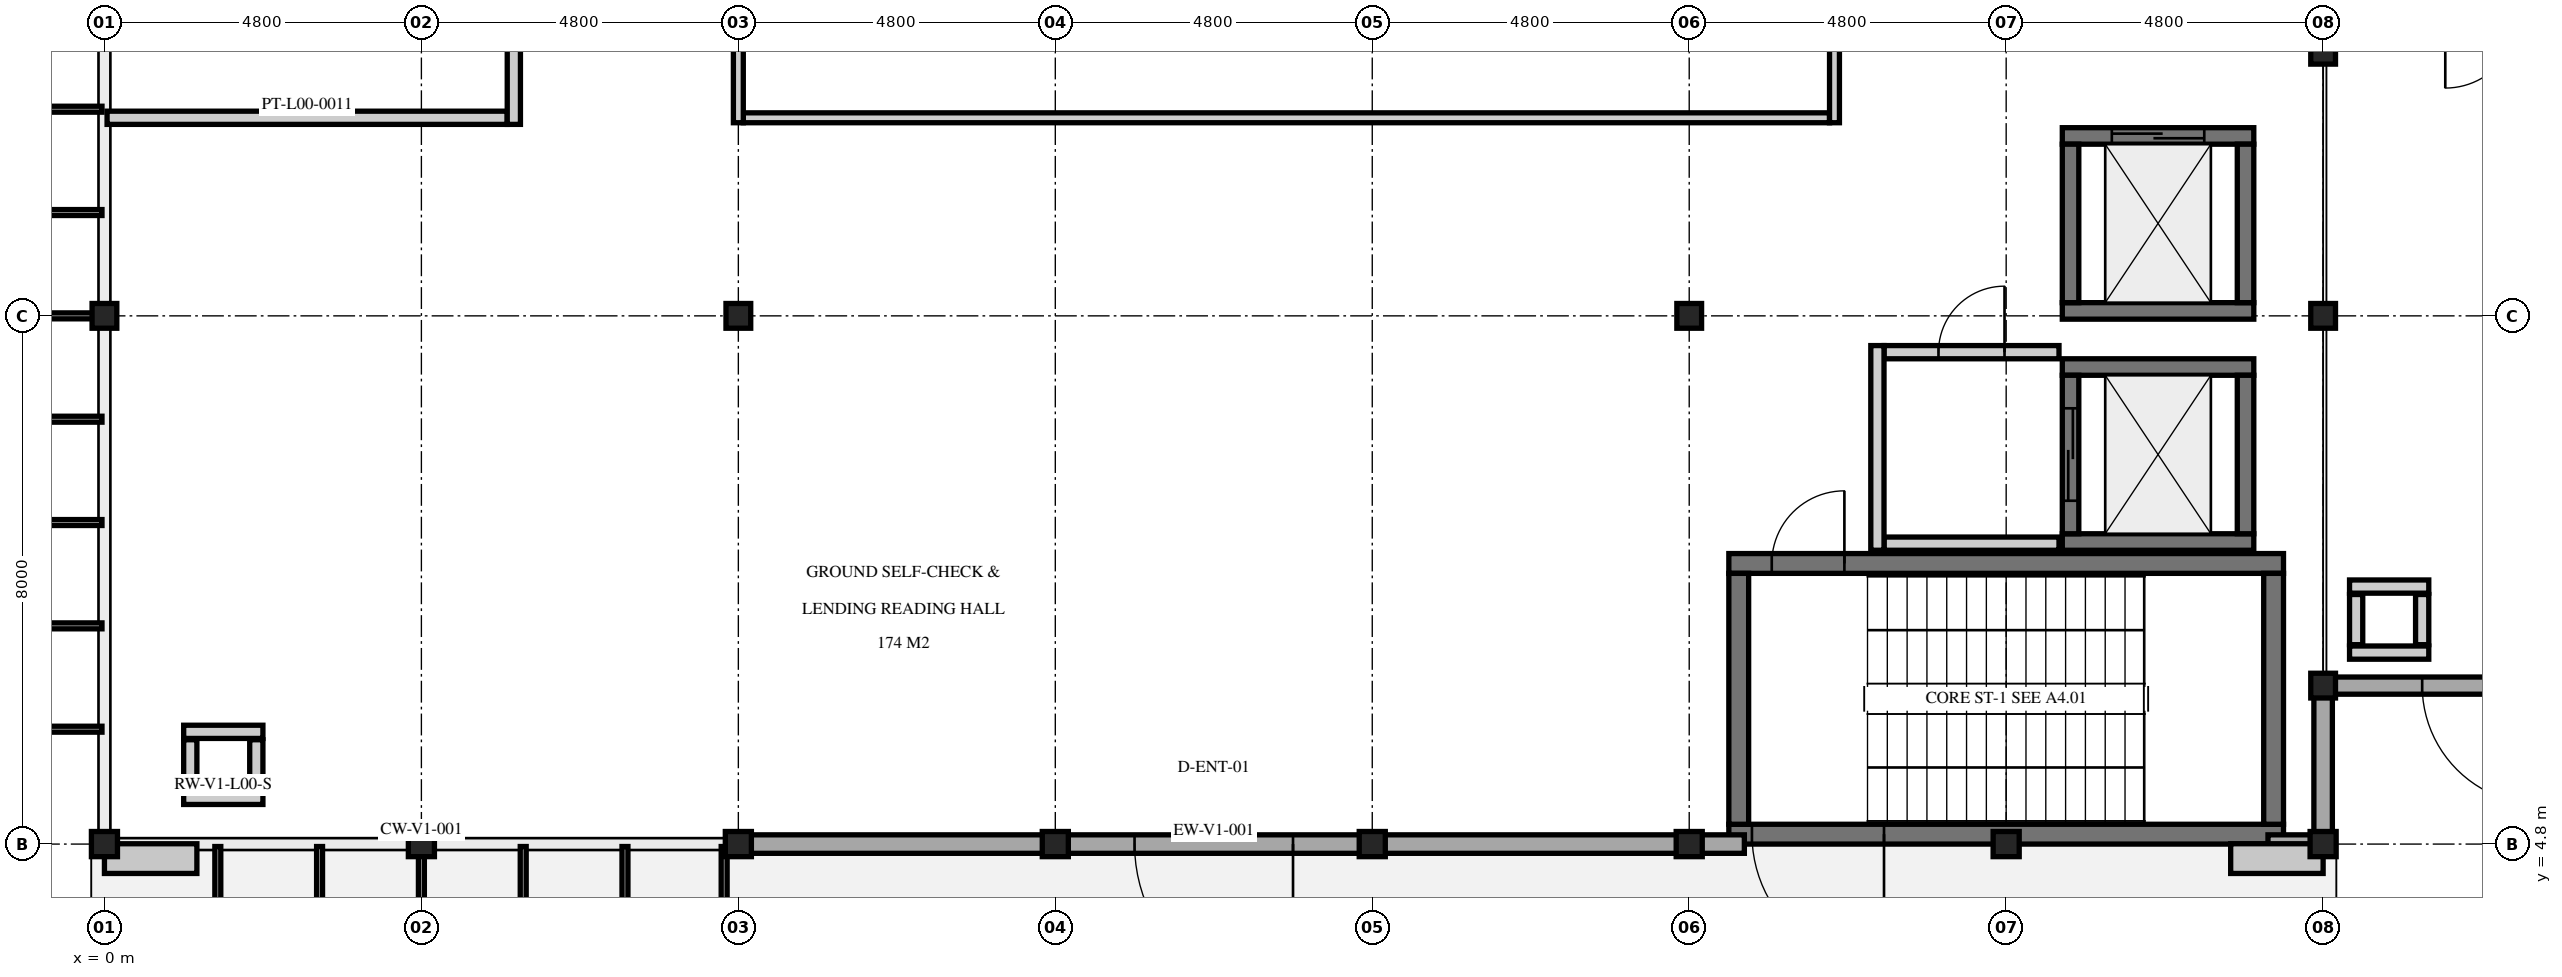
"""IFC4 building model, lengths in metres.
Left out: names, types, materials, properties, quantities, classifications, styles, units other than length and angle.
Written with IfcOpenShell. Run it as: python <this file> out.ifc"""

import sys

from ifc_helpers import new_model, si_unit, direction, frame, frame_2d, origin, origin_2d, place, context, subcontext, project, spatial, rectangle, i_section, extrude, element, fill, save


model = new_model("IFC4")
c1 = context("Model", 3, precision=1e-05, world=origin(), true_north=direction((0.0, 1.0)))
c2 = subcontext(c1, "Body", "Model", "MODEL_VIEW")
j1 = project(units=[si_unit("LENGTHUNIT", "METRE"), si_unit("PLANEANGLEUNIT", "RADIAN")], contexts=[c1])
p1 = place(None, origin())
s1 = spatial("IfcSite", under=j1, at=p1, CompositionType="ELEMENT")
p2 = place(p1, origin())
s2 = spatial("IfcBuilding", under=s1, at=p2, CompositionType="ELEMENT")
p3 = place(p2, origin())
s3 = spatial("IfcBuildingStorey", under=s2, at=p3, CompositionType="ELEMENT", Elevation=0.0)
for number, where, z_axis, x_axis in (
    (1, (0.0, 4.8, 0.0), (0.0, 0.0, 1.0), (1.0, 0.0, 0.0)),
    (2, (4.8, 4.8, 0.0), (0.0, 0.0, 1.0), (1.0, 0.0, 0.0)),
    (3, (9.6, 4.8, 0.0), (0.0, 0.0, 1.0), (1.0, 0.0, 0.0)),
    (4, (14.4, 4.8, 0.0), (0.0, 0.0, 1.0), (1.0, 0.0, 0.0)),
    (5, (19.2, 4.8, 0.0), (0.0, 0.0, 1.0), (1.0, 0.0, 0.0)),
    (6, (24.0, 4.8, 0.0), (0.0, 0.0, 1.0), (1.0, 0.0, 0.0)),
    (7, (28.8, 4.8, 0.0), (0.0, 0.0, 1.0), (1.0, 0.0, 0.0)),
    (8, (33.6, 4.8, 0.0), (0.0, 0.0, 1.0), (1.0, 0.0, 0.0)),
):
    element("IfcColumn", number, at=place(p3, frame(where, z_axis=z_axis, x_axis=x_axis)), inside=s3, PredefinedType="COLUMN", context=c2, shape_type="SweptSolid", body=[
        extrude(i_section(OverallWidth=0.395, OverallDepth=0.381, WebThickness=0.018, FlangeThickness=0.03, at=origin_2d()), origin(), (0.0, 0.0, 1.0), 5.1),
    ])
for number, where, z_axis, x_axis in (
    (9, (0.0, 12.8, 0.0), (0.0, 0.0, 1.0), (1.0, 0.0, 0.0)),
    (10, (33.6, 7.2, 0.0), (0.0, 0.0, 1.0), (1.0, 0.0, 0.0)),
    (11, (33.6, 12.8, 0.0), (0.0, 0.0, 1.0), (1.0, 0.0, 0.0)),
    (12, (33.6, 16.8, 0.0), (0.0, 0.0, 1.0), (1.0, 0.0, 0.0)),
    (13, (9.6, 12.8, 0.0), (0.0, 0.0, 1.0), (1.0, 0.0, 0.0)),
    (14, (24.0, 12.8, 0.0), (0.0, 0.0, 1.0), (1.0, 0.0, 0.0)),
):
    element("IfcColumn", number, at=place(p3, frame(where, z_axis=z_axis, x_axis=x_axis)), inside=s3, PredefinedType="COLUMN", context=c2, shape_type="SweptSolid", body=[
        extrude(i_section(OverallWidth=0.375, OverallDepth=0.375, WebThickness=0.017, FlangeThickness=0.027, at=origin_2d()), origin(), (0.0, 0.0, 1.0), 5.1),
    ])
p4 = place(p3, frame((33.0, 4.95, 0.0), z_axis=(0.0, 0.0, 1.0), x_axis=(-1.0, 0.0, 0.0)))
e15 = element("IfcWall", 15, at=p4, inside=s3, PredefinedType="SHEAR", context=c2, shape_type="SweptSolid", body=[
    extrude(rectangle(XDim=8.4, YDim=0.3, at=frame_2d((4.2, 0.0))), origin(), (0.0, 0.0, 1.0), 4.88),
])
p5 = place(p4, frame((6.05, 0.0, 0.0)))
e16 = element("IfcOpeningElement", 16, at=p5, cuts=e15, PredefinedType="OPENING", context=c2, shape_type="SweptSolid", body=[
    extrude(rectangle(XDim=2.0, YDim=2.4, at=frame_2d((1.0, 1.2))), frame((0.0, 0.16, 0.0), z_axis=(0.0, -1.0, 0.0), x_axis=(1.0, 0.0, 0.0)), (0.0, 0.0, 1.0), 0.32),
])
p6 = place(p3, frame((24.6, 9.05, 0.0), z_axis=(0.0, 0.0, 1.0), x_axis=(1.0, 0.0, 0.0)))
e17 = element("IfcWall", 17, at=p6, inside=s3, PredefinedType="SHEAR", context=c2, shape_type="SweptSolid", body=[
    extrude(rectangle(XDim=8.4, YDim=0.3, at=frame_2d((4.2, 0.0))), origin(), (0.0, 0.0, 1.0), 4.88),
])
p7 = place(p6, frame((0.65, 0.0, 0.0)))
e18 = element("IfcOpeningElement", 18, at=p7, cuts=e17, PredefinedType="OPENING", context=c2, shape_type="SweptSolid", body=[
    extrude(rectangle(XDim=1.1, YDim=2.2, at=frame_2d((0.55, 1.1))), frame((0.0, 0.16, 0.0), z_axis=(0.0, -1.0, 0.0), x_axis=(1.0, 0.0, 0.0)), (0.0, 0.0, 1.0), 0.32),
])
for number, where, z_axis, x_axis in (
    (19, (24.75, 5.1, 0.0), (0.0, 0.0, 1.0), (0.0, 1.0, 0.0)),
    (20, (32.85, 8.9, 0.0), (0.0, 0.0, 1.0), (0.0, -1.0, 0.0)),
):
    element("IfcWall", number, at=place(p3, frame(where, z_axis=z_axis, x_axis=x_axis)), inside=s3, PredefinedType="SHEAR", context=c2, shape_type="SweptSolid", body=[
        extrude(rectangle(XDim=3.8, YDim=0.3, at=frame_2d((1.9, 0.0))), origin(), (0.0, 0.0, 1.0), 4.88),
    ])
for number, where, z_axis, x_axis in (
    (21, (32.55, 9.375, 0.0), (0.0, 0.0, 1.0), (-1.0, 0.0, 0.0)),
    (22, (29.65, 12.025, 0.0), (0.0, 0.0, 1.0), (1.0, 0.0, 0.0)),
):
    element("IfcWall", number, at=place(p3, frame(where, z_axis=z_axis, x_axis=x_axis)), inside=s3, PredefinedType="SHEAR", context=c2, shape_type="SweptSolid", body=[
        extrude(rectangle(XDim=2.9, YDim=0.25, at=frame_2d((1.45, 0.0))), origin(), (0.0, 0.0, 1.0), 4.88),
    ])
p8 = place(p3, frame((29.775, 9.5, 0.0), z_axis=(0.0, 0.0, 1.0), x_axis=(0.0, 1.0, 0.0)))
e23 = element("IfcWall", 23, at=p8, inside=s3, PredefinedType="SHEAR", context=c2, shape_type="SweptSolid", body=[
    extrude(rectangle(XDim=2.4, YDim=0.25, at=frame_2d((1.2, 0.0))), origin(), (0.0, 0.0, 1.0), 4.88),
])
p9 = place(p8, frame((0.5, 0.0, 0.0)))
e24 = element("IfcOpeningElement", 24, at=p9, cuts=e23, PredefinedType="OPENING", context=c2, shape_type="SweptSolid", body=[
    extrude(rectangle(XDim=1.4, YDim=2.2, at=frame_2d((0.7, 1.1))), frame((0.0, 0.135, 0.0), z_axis=(0.0, -1.0, 0.0), x_axis=(1.0, 0.0, 0.0)), (0.0, 0.0, 1.0), 0.27),
])
p10 = place(p3, frame((32.425, 11.9, 0.0), z_axis=(0.0, 0.0, 1.0), x_axis=(0.0, -1.0, 0.0)))
e25 = element("IfcWall", 25, at=p10, inside=s3, PredefinedType="SHEAR", context=c2, shape_type="SweptSolid", body=[
    extrude(rectangle(XDim=2.4, YDim=0.25, at=frame_2d((1.2, 0.0))), origin(), (0.0, 0.0, 1.0), 4.88),
])
p11 = place(p3, frame((32.55, 12.875, 0.0), z_axis=(0.0, 0.0, 1.0), x_axis=(-1.0, 0.0, 0.0)))
e26 = element("IfcWall", 26, at=p11, inside=s3, PredefinedType="SHEAR", context=c2, shape_type="SweptSolid", body=[
    extrude(rectangle(XDim=2.9, YDim=0.25, at=frame_2d((1.45, 0.0))), origin(), (0.0, 0.0, 1.0), 4.88),
])
p12 = place(p3, frame((29.65, 15.525, 0.0), z_axis=(0.0, 0.0, 1.0), x_axis=(1.0, 0.0, 0.0)))
e27 = element("IfcWall", 27, at=p12, inside=s3, PredefinedType="SHEAR", context=c2, shape_type="SweptSolid", body=[
    extrude(rectangle(XDim=2.9, YDim=0.25, at=frame_2d((1.45, 0.0))), origin(), (0.0, 0.0, 1.0), 4.88),
])
p13 = place(p12, frame((0.75, 0.0, 0.0)))
e28 = element("IfcOpeningElement", 28, at=p13, cuts=e27, PredefinedType="OPENING", context=c2, shape_type="SweptSolid", body=[
    extrude(rectangle(XDim=1.4, YDim=2.2, at=frame_2d((0.7, 1.1))), frame((0.0, 0.135, 0.0), z_axis=(0.0, -1.0, 0.0), x_axis=(1.0, 0.0, 0.0)), (0.0, 0.0, 1.0), 0.27),
])
for number, where, z_axis, x_axis in (
    (29, (29.775, 13.0, 0.0), (0.0, 0.0, 1.0), (0.0, 1.0, 0.0)),
    (30, (32.425, 15.4, 0.0), (0.0, 0.0, 1.0), (0.0, -1.0, 0.0)),
):
    element("IfcWall", number, at=place(p3, frame(where, z_axis=z_axis, x_axis=x_axis)), inside=s3, PredefinedType="SHEAR", context=c2, shape_type="SweptSolid", body=[
        extrude(rectangle(XDim=2.4, YDim=0.25, at=frame_2d((1.2, 0.0))), origin(), (0.0, 0.0, 1.0), 4.88),
    ])
for number, where, z_axis, x_axis in (
    (31, (2.4, 5.5, 0.0), (0.0, 0.0, 1.0), (-1.0, 0.0, 0.0)),
    (32, (1.2, 6.5, 0.0), (0.0, 0.0, 1.0), (1.0, 0.0, 0.0)),
):
    element("IfcWall", number, at=place(p3, frame(where, z_axis=z_axis, x_axis=x_axis)), inside=s3, PredefinedType="PARTITIONING", context=c2, shape_type="SweptSolid", body=[
        extrude(rectangle(XDim=1.2, YDim=0.2, at=frame_2d((0.6, 0.0))), origin(), (0.0, 0.0, 1.0), 4.38),
    ])
for number, where, z_axis, x_axis in (
    (33, (1.3, 5.62, 0.0), (0.0, 0.0, 1.0), (0.0, 1.0, 0.0)),
    (34, (2.3, 6.38, 0.0), (0.0, 0.0, 1.0), (0.0, -1.0, 0.0)),
):
    element("IfcWall", number, at=place(p3, frame(where, z_axis=z_axis, x_axis=x_axis)), inside=s3, PredefinedType="PARTITIONING", context=c2, shape_type="SweptSolid", body=[
        extrude(rectangle(XDim=0.76, YDim=0.2, at=frame_2d((0.38, 0.0))), origin(), (0.0, 0.0, 1.0), 4.38),
    ])
for number, where, z_axis, x_axis in (
    (35, (35.2, 7.7, 0.0), (0.0, 0.0, 1.0), (-1.0, 0.0, 0.0)),
    (36, (34.0, 8.7, 0.0), (0.0, 0.0, 1.0), (1.0, 0.0, 0.0)),
):
    element("IfcWall", number, at=place(p3, frame(where, z_axis=z_axis, x_axis=x_axis)), inside=s3, PredefinedType="PARTITIONING", context=c2, shape_type="SweptSolid", body=[
        extrude(rectangle(XDim=1.2, YDim=0.2, at=frame_2d((0.6, 0.0))), origin(), (0.0, 0.0, 1.0), 4.38),
    ])
for number, where, z_axis, x_axis in (
    (37, (34.1, 7.82, 0.0), (0.0, 0.0, 1.0), (0.0, 1.0, 0.0)),
    (38, (35.1, 8.58, 0.0), (0.0, 0.0, 1.0), (0.0, -1.0, 0.0)),
):
    element("IfcWall", number, at=place(p3, frame(where, z_axis=z_axis, x_axis=x_axis)), inside=s3, PredefinedType="PARTITIONING", context=c2, shape_type="SweptSolid", body=[
        extrude(rectangle(XDim=0.76, YDim=0.2, at=frame_2d((0.38, 0.0))), origin(), (0.0, 0.0, 1.0), 4.38),
    ])
p14 = place(p3, frame((24.085, 4.8, 0.0), z_axis=(0.0, 0.0, 1.0), x_axis=(-1.0, 0.0, 0.0)))
e39 = element("IfcWall", 39, at=p14, inside=s3, PredefinedType="SOLIDWALL", context=c2, shape_type="SweptSolid", body=[
    extrude(rectangle(XDim=14.57, YDim=0.28, at=frame_2d((7.285, 0.0))), origin(), (0.0, 0.0, 1.0), 3.805),
])
p15 = place(p14, frame((6.085, 0.0, 0.0)))
e40 = element("IfcOpeningElement", 40, at=p15, cuts=e39, PredefinedType="OPENING", context=c2, shape_type="SweptSolid", body=[
    extrude(rectangle(XDim=2.4, YDim=2.6, at=frame_2d((1.2, 1.3))), frame((0.0, 0.15, 0.0), z_axis=(0.0, -1.0, 0.0), x_axis=(1.0, 0.0, 0.0)), (0.0, 0.0, 1.0), 0.3),
])
p16 = place(p3, frame((24.835, 4.8, 0.0), z_axis=(0.0, 0.0, 1.0), x_axis=(-1.0, 0.0, 0.0)))
e41 = element("IfcWall", 41, at=p16, inside=s3, PredefinedType="SOLIDWALL", context=c2, shape_type="SweptSolid", body=[
    extrude(rectangle(XDim=0.92, YDim=0.28, at=frame_2d((0.46, 0.0))), origin(), (0.0, 0.0, 1.0), 4.305),
])
p17 = place(p3, frame((33.685, 4.8, 0.0), z_axis=(0.0, 0.0, 1.0), x_axis=(-1.0, 0.0, 0.0)))
e42 = element("IfcWall", 42, at=p17, inside=s3, PredefinedType="SOLIDWALL", context=c2, shape_type="SweptSolid", body=[
    extrude(rectangle(XDim=0.92, YDim=0.28, at=frame_2d((0.46, 0.0))), origin(), (0.0, 0.0, 1.0), 4.305),
])
p18 = place(p3, frame((33.6, 7.285, 0.0), z_axis=(0.0, 0.0, 1.0), x_axis=(0.0, -1.0, 0.0)))
e43 = element("IfcWall", 43, at=p18, inside=s3, PredefinedType="SOLIDWALL", context=c2, shape_type="SweptSolid", body=[
    extrude(rectangle(XDim=2.57, YDim=0.28, at=frame_2d((1.285, 0.0))), origin(), (0.0, 0.0, 1.0), 4.305),
])
p19 = place(p3, frame((38.485, 7.2, 0.0), z_axis=(0.0, 0.0, 1.0), x_axis=(-1.0, 0.0, 0.0)))
e44 = element("IfcWall", 44, at=p19, inside=s3, PredefinedType="SOLIDWALL", context=c2, shape_type="SweptSolid", body=[
    extrude(rectangle(XDim=4.97, YDim=0.26, at=frame_2d((2.485, 0.0))), origin(), (0.0, 0.0, 1.0), 4.388),
])
p20 = place(p19, frame((1.585, 0.0, 0.0)))
e45 = element("IfcOpeningElement", 45, at=p20, cuts=e44, PredefinedType="OPENING", context=c2, shape_type="SweptSolid", body=[
    extrude(rectangle(XDim=1.8, YDim=2.4, at=frame_2d((0.9, 1.2))), frame((0.0, 0.14, 0.0), z_axis=(0.0, -1.0, 0.0), x_axis=(1.0, 0.0, 0.0)), (0.0, 0.0, 1.0), 0.28),
])
p21 = place(p3, frame((26.95, 9.35, 0.0), z_axis=(0.0, 0.0, 1.0), x_axis=(1.0, 0.0, 0.0)))
e46 = element("IfcWall", 46, at=p21, inside=s3, PredefinedType="PARTITIONING", context=c2, shape_type="SweptSolid", body=[
    extrude(rectangle(XDim=2.65, YDim=0.2, at=frame_2d((1.325, 0.0))), origin(), (0.0, 0.0, 1.0), 4.88),
])
p22 = place(p3, frame((26.95, 12.25, 0.0), z_axis=(0.0, 0.0, 1.0), x_axis=(1.0, 0.0, 0.0)))
e47 = element("IfcWall", 47, at=p22, inside=s3, PredefinedType="PARTITIONING", context=c2, shape_type="SweptSolid", body=[
    extrude(rectangle(XDim=2.65, YDim=0.2, at=frame_2d((1.325, 0.0))), origin(), (0.0, 0.0, 1.0), 4.88),
])
p23 = place(p22, frame((0.825, 0.0, 0.0)))
e48 = element("IfcOpeningElement", 48, at=p23, cuts=e47, PredefinedType="OPENING", context=c2, shape_type="SweptSolid", body=[
    extrude(rectangle(XDim=1.0, YDim=2.2, at=frame_2d((0.5, 1.1))), frame((0.0, 0.11, 0.0), z_axis=(0.0, -1.0, 0.0), x_axis=(1.0, 0.0, 0.0)), (0.0, 0.0, 1.0), 0.22),
])
p24 = place(p3, frame((26.85, 9.25, 0.0), z_axis=(0.0, 0.0, 1.0), x_axis=(0.0, 1.0, 0.0)))
e49 = element("IfcWall", 49, at=p24, inside=s3, PredefinedType="PARTITIONING", context=c2, shape_type="SweptSolid", body=[
    extrude(rectangle(XDim=3.1, YDim=0.2, at=frame_2d((1.55, 0.0))), origin(), (0.0, 0.0, 1.0), 4.88),
])
p25 = place(p3, frame((0.04, 15.8, 0.0), z_axis=(0.0, 0.0, 1.0), x_axis=(1.0, 0.0, 0.0)))
e50 = element("IfcWall", 50, at=p25, inside=s3, PredefinedType="PARTITIONING", context=c2, shape_type="SweptSolid", body=[
    extrude(rectangle(XDim=6.06, YDim=0.2, at=frame_2d((3.03, 0.0))), origin(), (0.0, 0.0, 1.0), 4.405),
])
p26 = place(p3, frame((6.2, 15.7, 0.0), z_axis=(0.0, 0.0, 1.0), x_axis=(0.0, 1.0, 0.0)))
e51 = element("IfcWall", 51, at=p26, inside=s3, PredefinedType="PARTITIONING", context=c2, shape_type="SweptSolid", body=[
    extrude(rectangle(XDim=7.76, YDim=0.2, at=frame_2d((3.88, 0.0))), origin(), (0.0, 0.0, 1.0), 4.305),
])
p27 = place(p26, frame((3.255, 0.0, 0.0)))
e52 = element("IfcOpeningElement", 52, at=p27, cuts=e51, PredefinedType="OPENING", context=c2, shape_type="SweptSolid", body=[
    extrude(rectangle(XDim=1.25, YDim=2.25, at=frame_2d((0.625, 1.125))), frame((0.0, 0.11, 0.0), z_axis=(0.0, -1.0, 0.0), x_axis=(1.0, 0.0, 0.0)), (0.0, 0.0, 1.0), 0.22),
])
p28 = place(p3, frame((9.675, 15.8, 0.0), z_axis=(0.0, 0.0, 1.0), x_axis=(1.0, 0.0, 0.0)))
e53 = element("IfcWall", 53, at=p28, inside=s3, PredefinedType="PARTITIONING", context=c2, shape_type="SweptSolid", body=[
    extrude(rectangle(XDim=16.45, YDim=0.15, at=frame_2d((8.225, 0.0))), origin(), (0.0, 0.0, 1.0), 4.405),
])
p29 = place(p3, frame((9.6, 15.725, 0.0), z_axis=(0.0, 0.0, 1.0), x_axis=(0.0, 1.0, 0.0)))
e54 = element("IfcWall", 54, at=p29, inside=s3, PredefinedType="PARTITIONING", context=c2, shape_type="SweptSolid", body=[
    extrude(rectangle(XDim=10.75, YDim=0.15, at=frame_2d((5.375, 0.0))), origin(), (0.0, 0.0, 1.0), 4.305),
])
p30 = place(p29, frame((6.575, 0.0, 0.0)))
e55 = element("IfcOpeningElement", 55, at=p30, cuts=e54, PredefinedType="OPENING", context=c2, shape_type="SweptSolid", body=[
    extrude(rectangle(XDim=1.6, YDim=2.25, at=frame_2d((0.8, 1.125))), frame((0.0, 0.085, 0.0), z_axis=(0.0, -1.0, 0.0), x_axis=(1.0, 0.0, 0.0)), (0.0, 0.0, 1.0), 0.17),
])
p31 = place(p3, frame((26.2, 15.725, 0.0), z_axis=(0.0, 0.0, 1.0), x_axis=(0.0, 1.0, 0.0)))
e56 = element("IfcWall", 56, at=p31, inside=s3, PredefinedType="PARTITIONING", context=c2, shape_type="SweptSolid", body=[
    extrude(rectangle(XDim=10.75, YDim=0.15, at=frame_2d((5.375, 0.0))), origin(), (0.0, 0.0, 1.0), 4.305),
])
p32 = place(p7, origin())
e57 = element("IfcDoor", 57, at=p32, inside=s3, OperationType="SINGLE_SWING_RIGHT", PredefinedType="DOOR", context=c2, shape_type="SweptSolid", body=[
    extrude(rectangle(XDim=1.1, YDim=2.2, at=frame_2d((0.55, 1.1))), frame((0.0, 0.025, 0.0), z_axis=(0.0, -1.0, 0.0), x_axis=(1.0, 0.0, 0.0)), (0.0, 0.0, 1.0), 0.05),
])
fill(e18, e57)
p33 = place(p5, origin())
e58 = element("IfcDoor", 58, at=p33, inside=s3, OperationType="SINGLE_SWING_LEFT", PredefinedType="DOOR", context=c2, shape_type="SweptSolid", body=[
    extrude(rectangle(XDim=2.0, YDim=2.4, at=frame_2d((1.0, 1.2))), frame((0.0, 0.025, 0.0), z_axis=(0.0, -1.0, 0.0), x_axis=(1.0, 0.0, 0.0)), (0.0, 0.0, 1.0), 0.05),
])
fill(e16, e58)
p34 = place(p9, origin())
e59 = element("IfcDoor", 59, at=p34, inside=s3, OperationType="DOUBLE_DOOR_SLIDING", PredefinedType="DOOR", context=c2, shape_type="SweptSolid", body=[
    extrude(rectangle(XDim=1.4, YDim=2.2, at=frame_2d((0.7, 1.1))), frame((0.0, 0.025, 0.0), z_axis=(0.0, -1.0, 0.0), x_axis=(1.0, 0.0, 0.0)), (0.0, 0.0, 1.0), 0.05),
])
fill(e24, e59)
p35 = place(p13, origin())
e60 = element("IfcDoor", 60, at=p35, inside=s3, OperationType="DOUBLE_DOOR_SLIDING", PredefinedType="DOOR", context=c2, shape_type="SweptSolid", body=[
    extrude(rectangle(XDim=1.4, YDim=2.2, at=frame_2d((0.7, 1.1))), frame((0.0, 0.025, 0.0), z_axis=(0.0, -1.0, 0.0), x_axis=(1.0, 0.0, 0.0)), (0.0, 0.0, 1.0), 0.05),
])
fill(e28, e60)
p36 = place(p15, origin())
e61 = element("IfcDoor", 61, at=p36, inside=s3, OperationType="DOUBLE_SWING_LEFT", PredefinedType="DOOR", context=c2, shape_type="SweptSolid", body=[
    extrude(rectangle(XDim=2.4, YDim=2.6, at=frame_2d((1.2, 1.3))), frame((0.0, 0.025, 0.0), z_axis=(0.0, -1.0, 0.0), x_axis=(1.0, 0.0, 0.0)), (0.0, 0.0, 1.0), 0.05),
])
fill(e40, e61)
p37 = place(p20, origin())
e62 = element("IfcDoor", 62, at=p37, inside=s3, OperationType="SINGLE_SWING_LEFT", PredefinedType="DOOR", context=c2, shape_type="SweptSolid", body=[
    extrude(rectangle(XDim=1.8, YDim=2.4, at=frame_2d((0.9, 1.2))), frame((0.0, 0.025, 0.0), z_axis=(0.0, -1.0, 0.0), x_axis=(1.0, 0.0, 0.0)), (0.0, 0.0, 1.0), 0.05),
])
fill(e45, e62)
p38 = place(p23, origin())
e63 = element("IfcDoor", 63, at=p38, inside=s3, OperationType="SINGLE_SWING_RIGHT", PredefinedType="DOOR", context=c2, shape_type="SweptSolid", body=[
    extrude(rectangle(XDim=1.0, YDim=2.2, at=frame_2d((0.5, 1.1))), frame((0.0, 0.025, 0.0), z_axis=(0.0, -1.0, 0.0), x_axis=(1.0, 0.0, 0.0)), (0.0, 0.0, 1.0), 0.05),
])
fill(e48, e63)
save(model, sys.argv[1])
